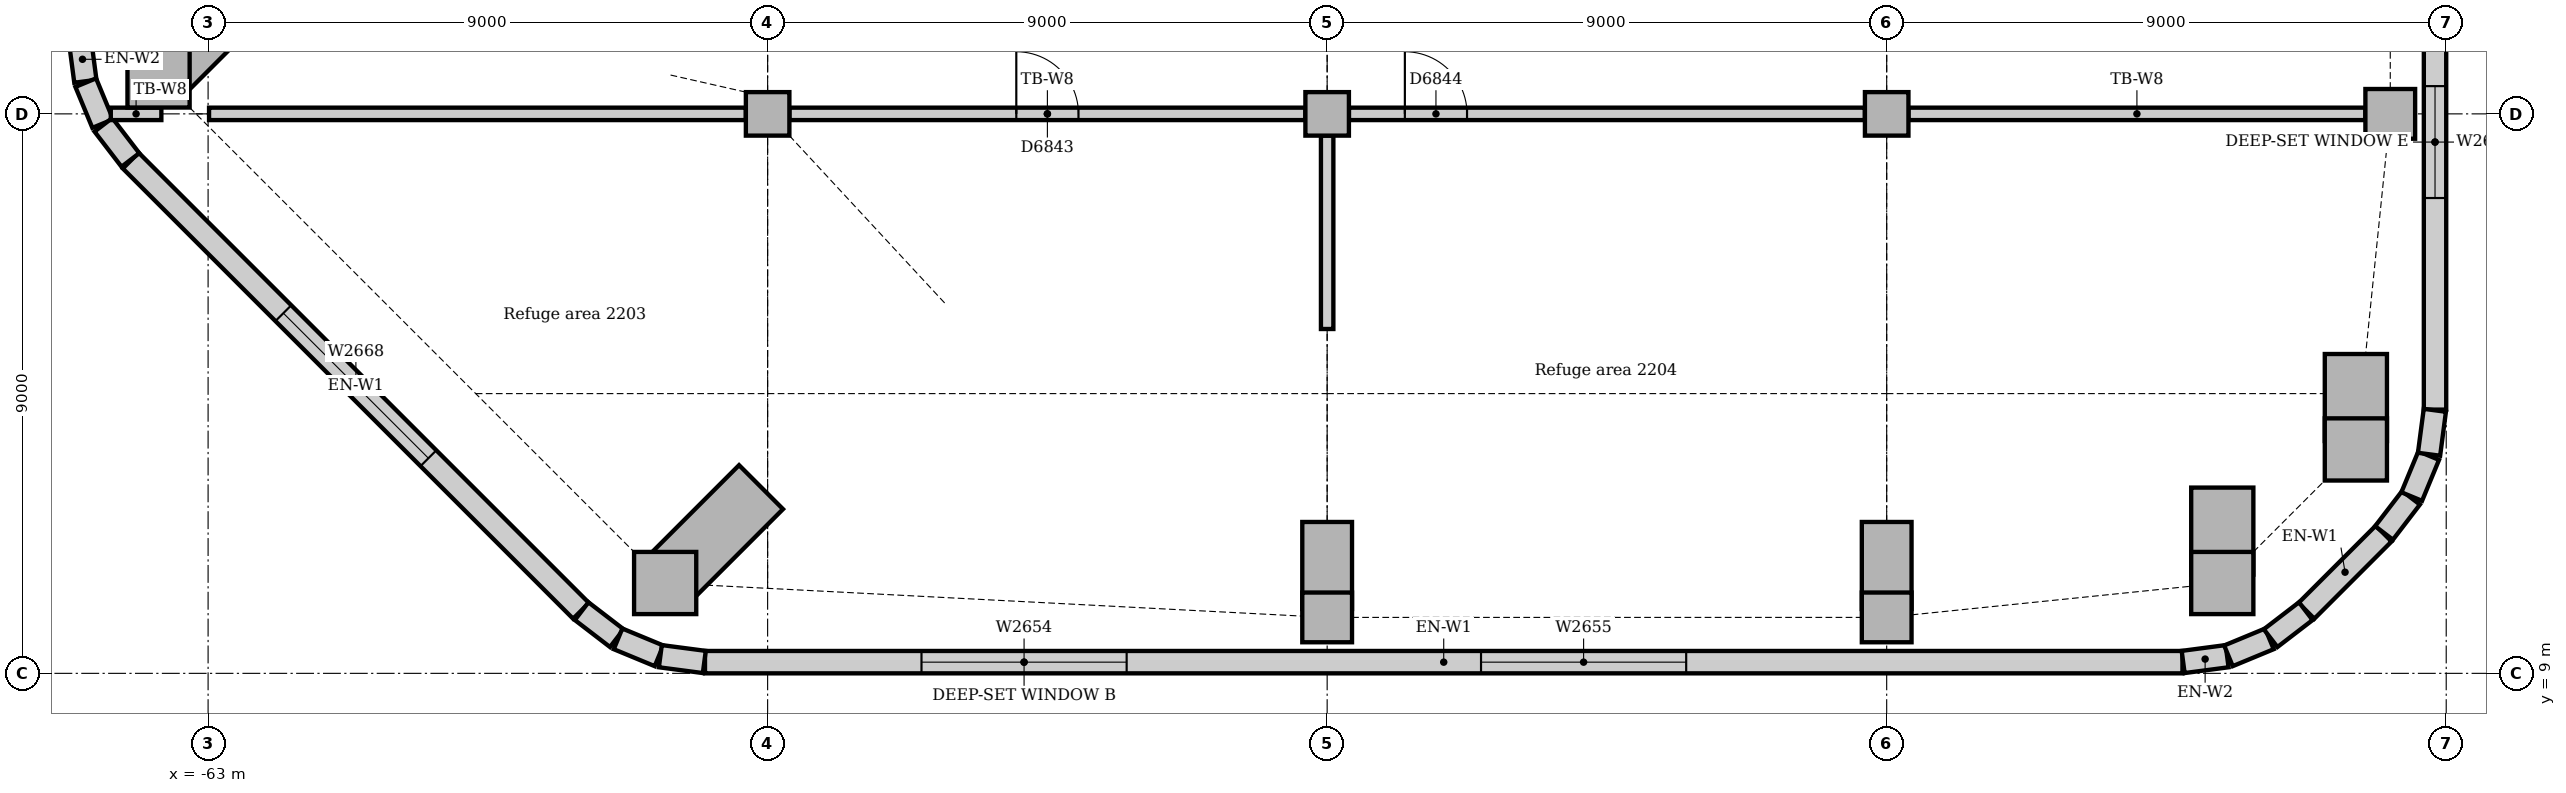
"""IFC4 building model, lengths in metres.
Left out: names, types, materials, properties, quantities, classifications, styles, units other than length and angle.
Written with IfcOpenShell. Run it as: python <this file> out.ifc"""

import sys

from ifc_helpers import new_model, si_unit, direction, frame, frame_2d, origin, origin_2d, place, context, subcontext, project, spatial, rectangle, extrude, element, fill, save


model = new_model("IFC4")
c1 = context("Model", 3, precision=1e-05, world=origin(), true_north=direction((0.0, 1.0)))
c2 = subcontext(c1, "Body", "Model", "MODEL_VIEW")
j1 = project(units=[si_unit("LENGTHUNIT", "METRE"), si_unit("PLANEANGLEUNIT", "RADIAN")], contexts=[c1])
p1 = place(None, origin())
s1 = spatial("IfcSite", under=j1, at=p1, CompositionType="ELEMENT")
p2 = place(p1, origin())
s2 = spatial("IfcBuilding", under=s1, at=p2, CompositionType="ELEMENT")
p3 = place(p2, frame((0.0, 0.0, 95.0)))
s3 = spatial("IfcBuildingStorey", under=s2, at=p3, CompositionType="ELEMENT", Elevation=95.0)
for number, where, z_axis, x_axis in (
    (1, (-55.648, 10.453, 0.0), (0.0, 0.0, 1.0), (1.0, 0.0, 0.0)),
    (2, (-30.602, 10.453, 0.0), (0.0, 0.0, 1.0), (1.0, 0.0, 0.0)),
    (3, (-28.453, 12.602, 0.0), (0.0, 0.0, 1.0), (1.0, 0.0, 0.0)),
    (4, (-63.797, 18.602, 0.0), (0.0, 0.0, 1.0), (1.0, 0.0, 0.0)),
):
    element("IfcColumn", number, at=place(p3, frame(where, z_axis=z_axis, x_axis=x_axis)), inside=s3, PredefinedType="COLUMN", context=c2, shape_type="SweptSolid", body=[
        extrude(rectangle(XDim=1.0, YDim=1.0, at=origin_2d()), origin(), (0.0, 0.0, 1.0), 4.85),
    ])
for number, where, z_axis, x_axis in (
    (5, (-45.0, 9.9, 0.0), (0.0, 0.0, 1.0), (1.0, 0.0, 0.0)),
    (6, (-36.0, 9.9, 0.0), (0.0, 0.0, 1.0), (1.0, 0.0, 0.0)),
    (7, (-27.9, 18.0, 0.0), (0.0, 0.0, 1.0), (1.0, 0.0, 0.0)),
):
    element("IfcColumn", number, at=place(p3, frame(where, z_axis=z_axis, x_axis=x_axis)), inside=s3, PredefinedType="COLUMN", context=c2, shape_type="SweptSolid", body=[
        extrude(rectangle(XDim=0.8, YDim=0.8, at=origin_2d()), origin(), (0.0, 0.0, 1.0), 4.85),
    ])
for number, where, z_axis, x_axis in (
    (8, (-54.0, 18.0, 0.0), (0.0, 0.0, 1.0), (1.0, 0.0, 0.0)),
    (9, (-45.0, 18.0, 0.0), (0.0, 0.0, 1.0), (1.0, 0.0, 0.0)),
    (10, (-36.0, 18.0, 0.0), (0.0, 0.0, 1.0), (1.0, 0.0, 0.0)),
):
    element("IfcColumn", number, at=place(p3, frame(where, z_axis=z_axis, x_axis=x_axis)), inside=s3, PredefinedType="COLUMN", context=c2, shape_type="SweptSolid", body=[
        extrude(rectangle(XDim=0.7, YDim=0.7, at=origin_2d()), origin(), (0.0, 0.0, 1.0), 4.85),
    ])
p4 = place(p3, frame((-55.007, 9.18, 0.0), z_axis=(0.0, 0.0, 1.0), x_axis=(1.0, 0.0, 0.0)))
e11 = element("IfcWall", 11, at=p4, inside=s3, PredefinedType="STANDARD", context=c2, shape_type="SweptSolid", body=[
    extrude(rectangle(XDim=23.765, YDim=0.36, at=frame_2d((11.882, 0.0))), origin(), (0.0, 0.0, 1.0), 4.85),
])
p5 = place(p4, frame((3.482, 0.0, 0.9)))
e12 = element("IfcOpeningElement", 12, at=p5, cuts=e11, PredefinedType="OPENING", context=c2, shape_type="SweptSolid", body=[
    extrude(rectangle(XDim=3.3, YDim=2.2, at=frame_2d((1.65, 1.1))), frame((0.0, 0.19, 0.0), z_axis=(0.0, -1.0, 0.0), x_axis=(1.0, 0.0, 0.0)), (0.0, 0.0, 1.0), 0.38),
])
p6 = place(p4, frame((12.482, 0.0, 0.9)))
e13 = element("IfcOpeningElement", 13, at=p6, cuts=e11, PredefinedType="OPENING", context=c2, shape_type="SweptSolid", body=[
    extrude(rectangle(XDim=3.3, YDim=2.2, at=frame_2d((1.65, 1.1))), frame((0.0, 0.19, 0.0), z_axis=(0.0, -1.0, 0.0), x_axis=(1.0, 0.0, 0.0)), (0.0, 0.0, 1.0), 0.38),
])
p7 = place(p3, frame((-29.249, 10.006, 0.0), z_axis=(0.0, 0.0, 1.0), x_axis=(0.707106781187, 0.707106781187, 0.0)))
e14 = element("IfcWall", 14, at=p7, inside=s3, PredefinedType="STANDARD", context=c2, shape_type="SweptSolid", body=[
    extrude(rectangle(XDim=1.757, YDim=0.36, at=frame_2d((0.879, 0.0))), origin(), (0.0, 0.0, 1.0), 4.85),
])
p8 = place(p3, frame((-27.18, 13.243, 0.0), z_axis=(0.0, 0.0, 1.0), x_axis=(0.0, 1.0, 0.0)))
e15 = element("IfcWall", 15, at=p8, inside=s3, PredefinedType="STANDARD", context=c2, shape_type="SweptSolid", body=[
    extrude(rectangle(XDim=7.757, YDim=0.36, at=frame_2d((3.879, 0.0))), origin(), (0.0, 0.0, 1.0), 4.85),
])
p9 = place(p8, frame((3.404, 0.0, 0.9)))
e16 = element("IfcOpeningElement", 16, at=p9, cuts=e15, PredefinedType="OPENING", context=c2, shape_type="SweptSolid", body=[
    extrude(rectangle(XDim=1.8, YDim=2.2, at=frame_2d((0.9, 1.1))), frame((0.0, 0.19, 0.0), z_axis=(0.0, -1.0, 0.0), x_axis=(1.0, 0.0, 0.0)), (0.0, 0.0, 1.0), 0.38),
])
p10 = place(p3, frame((-64.244, 17.249, 0.0), z_axis=(0.0, 0.0, 1.0), x_axis=(0.707106781187, -0.707106781187, 0.0)))
e17 = element("IfcWall", 17, at=p10, inside=s3, PredefinedType="STANDARD", context=c2, shape_type="SweptSolid", body=[
    extrude(rectangle(XDim=10.243, YDim=0.36, at=frame_2d((5.121, 0.0))), origin(), (0.0, 0.0, 1.0), 4.85),
])
p11 = place(p10, frame((3.471, 0.0, 0.9)))
e18 = element("IfcOpeningElement", 18, at=p11, cuts=e17, PredefinedType="OPENING", context=c2, shape_type="SweptSolid", body=[
    extrude(rectangle(XDim=3.3, YDim=2.2, at=frame_2d((1.65, 1.1))), frame((0.0, 0.19, 0.0), z_axis=(0.0, -1.0, 0.0), x_axis=(1.0, 0.0, 0.0)), (0.0, 0.0, 1.0), 0.38),
])
for number, where, z_axis, x_axis in (
    (19, (-31.231, 9.183, 0.0), (0.0, 0.0, 1.0), (0.991, 0.131, 0.0)),
    (20, (-30.503, 9.282, 0.0), (0.0, 0.0, 1.0), (0.924, 0.383, 0.0)),
):
    element("IfcWall", number, at=place(p3, frame(where, z_axis=z_axis, x_axis=x_axis)), inside=s3, PredefinedType="STANDARD", context=c2, shape_type="SweptSolid", body=[
        extrude(rectangle(XDim=0.713, YDim=0.36, at=frame_2d((0.356, 0.0))), origin(), (0.0, 0.0, 1.0), 4.85),
    ])
for number, where, z_axis, x_axis in (
    (21, (-29.825, 9.566, 0.0), (0.0, 0.0, 1.0), (0.793, 0.609, 0.0)),
    (22, (-28.0, 11.259, 0.0), (0.0, 0.0, 1.0), (0.609, 0.793, 0.0)),
):
    element("IfcWall", number, at=place(p3, frame(where, z_axis=z_axis, x_axis=x_axis)), inside=s3, PredefinedType="STANDARD", context=c2, shape_type="SweptSolid", body=[
        extrude(rectangle(XDim=0.713, YDim=0.36, at=frame_2d((0.357, 0.0))), origin(), (0.0, 0.0, 1.0), 4.85),
    ])
for number, where, z_axis, x_axis in (
    (23, (-27.555, 11.844, 0.0), (0.0, 0.0, 1.0), (0.383, 0.924, 0.0)),
    (24, (-27.276, 12.524, 0.0), (0.0, 0.0, 1.0), (0.131, 0.991, 0.0)),
    (25, (-65.067, 19.231, 0.0), (0.0, 0.0, 1.0), (0.131, -0.991, 0.0)),
    (26, (-64.968, 18.503, 0.0), (0.0, 0.0, 1.0), (0.383, -0.924, 0.0)),
):
    element("IfcWall", number, at=place(p3, frame(where, z_axis=z_axis, x_axis=x_axis)), inside=s3, PredefinedType="STANDARD", context=c2, shape_type="SweptSolid", body=[
        extrude(rectangle(XDim=0.713, YDim=0.36, at=frame_2d((0.356, 0.0))), origin(), (0.0, 0.0, 1.0), 4.85),
    ])
for number, where, z_axis, x_axis in (
    (27, (-64.684, 17.825, 0.0), (0.0, 0.0, 1.0), (0.609, -0.793, 0.0)),
    (28, (-56.991, 10.0, 0.0), (0.0, 0.0, 1.0), (0.793, -0.609, 0.0)),
):
    element("IfcWall", number, at=place(p3, frame(where, z_axis=z_axis, x_axis=x_axis)), inside=s3, PredefinedType="STANDARD", context=c2, shape_type="SweptSolid", body=[
        extrude(rectangle(XDim=0.713, YDim=0.36, at=frame_2d((0.357, 0.0))), origin(), (0.0, 0.0, 1.0), 4.85),
    ])
for number, where, z_axis, x_axis in (
    (29, (-56.406, 9.555, 0.0), (0.0, 0.0, 1.0), (0.924, -0.383, 0.0)),
    (30, (-55.726, 9.276, 0.0), (0.0, 0.0, 1.0), (0.991, -0.131, 0.0)),
):
    element("IfcWall", number, at=place(p3, frame(where, z_axis=z_axis, x_axis=x_axis)), inside=s3, PredefinedType="STANDARD", context=c2, shape_type="SweptSolid", body=[
        extrude(rectangle(XDim=0.713, YDim=0.36, at=frame_2d((0.356, 0.0))), origin(), (0.0, 0.0, 1.0), 4.85),
    ])
p12 = place(p3, frame((-35.65, 18.0, 0.0), z_axis=(0.0, 0.0, 1.0), x_axis=(1.0, 0.0, 0.0)))
e31 = element("IfcWall", 31, at=p12, inside=s3, PredefinedType="PARTITIONING", context=c2, shape_type="SweptSolid", body=[
    extrude(rectangle(XDim=7.35, YDim=0.2, at=frame_2d((3.675, 0.0))), origin(), (0.0, 0.0, 1.0), 4.262),
])
p13 = place(p3, frame((-44.65, 18.0, 0.0), z_axis=(0.0, 0.0, 1.0), x_axis=(1.0, 0.0, 0.0)))
e32 = element("IfcWall", 32, at=p13, inside=s3, PredefinedType="PARTITIONING", context=c2, shape_type="SweptSolid", body=[
    extrude(rectangle(XDim=8.3, YDim=0.2, at=frame_2d((4.15, 0.0))), origin(), (0.0, 0.0, 1.0), 4.262),
])
p14 = place(p13, frame((0.9, 0.0, 0.0)))
e33 = element("IfcOpeningElement", 33, at=p14, cuts=e32, PredefinedType="OPENING", context=c2, shape_type="SweptSolid", body=[
    extrude(rectangle(XDim=1.0, YDim=2.1, at=frame_2d((0.5, 1.05))), frame((0.0, 0.11, 0.0), z_axis=(0.0, -1.0, 0.0), x_axis=(1.0, 0.0, 0.0)), (0.0, 0.0, 1.0), 0.22),
])
p15 = place(p3, frame((-53.65, 18.0, 0.0), z_axis=(0.0, 0.0, 1.0), x_axis=(1.0, 0.0, 0.0)))
e34 = element("IfcWall", 34, at=p15, inside=s3, PredefinedType="PARTITIONING", context=c2, shape_type="SweptSolid", body=[
    extrude(rectangle(XDim=8.3, YDim=0.2, at=frame_2d((4.15, 0.0))), origin(), (0.0, 0.0, 1.0), 4.262),
])
p16 = place(p15, frame((3.65, 0.0, 0.0)))
e35 = element("IfcOpeningElement", 35, at=p16, cuts=e34, PredefinedType="OPENING", context=c2, shape_type="SweptSolid", body=[
    extrude(rectangle(XDim=1.0, YDim=2.1, at=frame_2d((0.5, 1.05))), frame((0.0, 0.11, 0.0), z_axis=(0.0, -1.0, 0.0), x_axis=(1.0, 0.0, 0.0)), (0.0, 0.0, 1.0), 0.22),
])
p17 = place(p3, frame((-62.985, 18.0, 0.0), z_axis=(0.0, 0.0, 1.0), x_axis=(1.0, 0.0, 0.0)))
e36 = element("IfcWall", 36, at=p17, inside=s3, PredefinedType="PARTITIONING", context=c2, shape_type="SweptSolid", body=[
    extrude(rectangle(XDim=8.635, YDim=0.2, at=frame_2d((4.317, 0.0))), origin(), (0.0, 0.0, 1.0), 4.262),
])
p18 = place(p3, frame((-64.565, 18.0, 0.0), z_axis=(0.0, 0.0, 1.0), x_axis=(1.0, 0.0, 0.0)))
e37 = element("IfcWall", 37, at=p18, inside=s3, PredefinedType="PARTITIONING", context=c2, shape_type="SweptSolid", body=[
    extrude(rectangle(XDim=0.813, YDim=0.2, at=frame_2d((0.407, 0.0))), origin(), (0.0, 0.0, 1.0), 4.85),
])
p19 = place(p3, frame((-45.0, 14.539, 0.0), z_axis=(0.0, 0.0, 1.0), x_axis=(0.0, 1.0, 0.0)))
e38 = element("IfcWall", 38, at=p19, inside=s3, PredefinedType="PARTITIONING", context=c2, shape_type="SweptSolid", body=[
    extrude(rectangle(XDim=3.111, YDim=0.2, at=frame_2d((1.555, 0.0))), origin(), (0.0, 0.0, 1.0), 4.85),
])
p20 = place(p5, origin())
e39 = element("IfcWindow", 39, at=p20, inside=s3, PartitioningType="SINGLE_PANEL", PredefinedType="WINDOW", context=c2, shape_type="SweptSolid", body=[
    extrude(rectangle(XDim=3.3, YDim=2.2, at=frame_2d((1.65, 1.1))), frame((0.0, 0.13, 0.0), z_axis=(0.0, -1.0, 0.0), x_axis=(1.0, 0.0, 0.0)), (0.0, 0.0, 1.0), 0.06),
])
fill(e12, e39)
p21 = place(p6, origin())
e40 = element("IfcWindow", 40, at=p21, inside=s3, PartitioningType="SINGLE_PANEL", PredefinedType="WINDOW", context=c2, shape_type="SweptSolid", body=[
    extrude(rectangle(XDim=3.3, YDim=2.2, at=frame_2d((1.65, 1.1))), frame((0.0, 0.13, 0.0), z_axis=(0.0, -1.0, 0.0), x_axis=(1.0, 0.0, 0.0)), (0.0, 0.0, 1.0), 0.06),
])
fill(e13, e40)
p22 = place(p9, origin())
e41 = element("IfcWindow", 41, at=p22, inside=s3, PartitioningType="SINGLE_PANEL", PredefinedType="WINDOW", context=c2, shape_type="SweptSolid", body=[
    extrude(rectangle(XDim=1.8, YDim=2.2, at=frame_2d((0.9, 1.1))), frame((0.0, 0.13, 0.0), z_axis=(0.0, -1.0, 0.0), x_axis=(1.0, 0.0, 0.0)), (0.0, 0.0, 1.0), 0.06),
])
fill(e16, e41)
p23 = place(p11, origin())
e42 = element("IfcWindow", 42, at=p23, inside=s3, PartitioningType="SINGLE_PANEL", PredefinedType="WINDOW", context=c2, shape_type="SweptSolid", body=[
    extrude(rectangle(XDim=3.3, YDim=2.2, at=frame_2d((1.65, 1.1))), frame((0.0, 0.13, 0.0), z_axis=(0.0, -1.0, 0.0), x_axis=(1.0, 0.0, 0.0)), (0.0, 0.0, 1.0), 0.06),
])
fill(e18, e42)
p24 = place(p16, origin())
e43 = element("IfcDoor", 43, at=p24, inside=s3, OperationType="SINGLE_SWING_LEFT", PredefinedType="DOOR", context=c2, shape_type="SweptSolid", body=[
    extrude(rectangle(XDim=1.0, YDim=2.1, at=frame_2d((0.5, 1.05))), frame((0.0, 0.025, 0.0), z_axis=(0.0, -1.0, 0.0), x_axis=(1.0, 0.0, 0.0)), (0.0, 0.0, 1.0), 0.05),
])
fill(e35, e43)
p25 = place(p14, origin())
e44 = element("IfcDoor", 44, at=p25, inside=s3, OperationType="SINGLE_SWING_LEFT", PredefinedType="DOOR", context=c2, shape_type="SweptSolid", body=[
    extrude(rectangle(XDim=1.0, YDim=2.1, at=frame_2d((0.5, 1.05))), frame((0.0, 0.025, 0.0), z_axis=(0.0, -1.0, 0.0), x_axis=(1.0, 0.0, 0.0)), (0.0, 0.0, 1.0), 0.05),
])
fill(e33, e44)
save(model, sys.argv[1])
